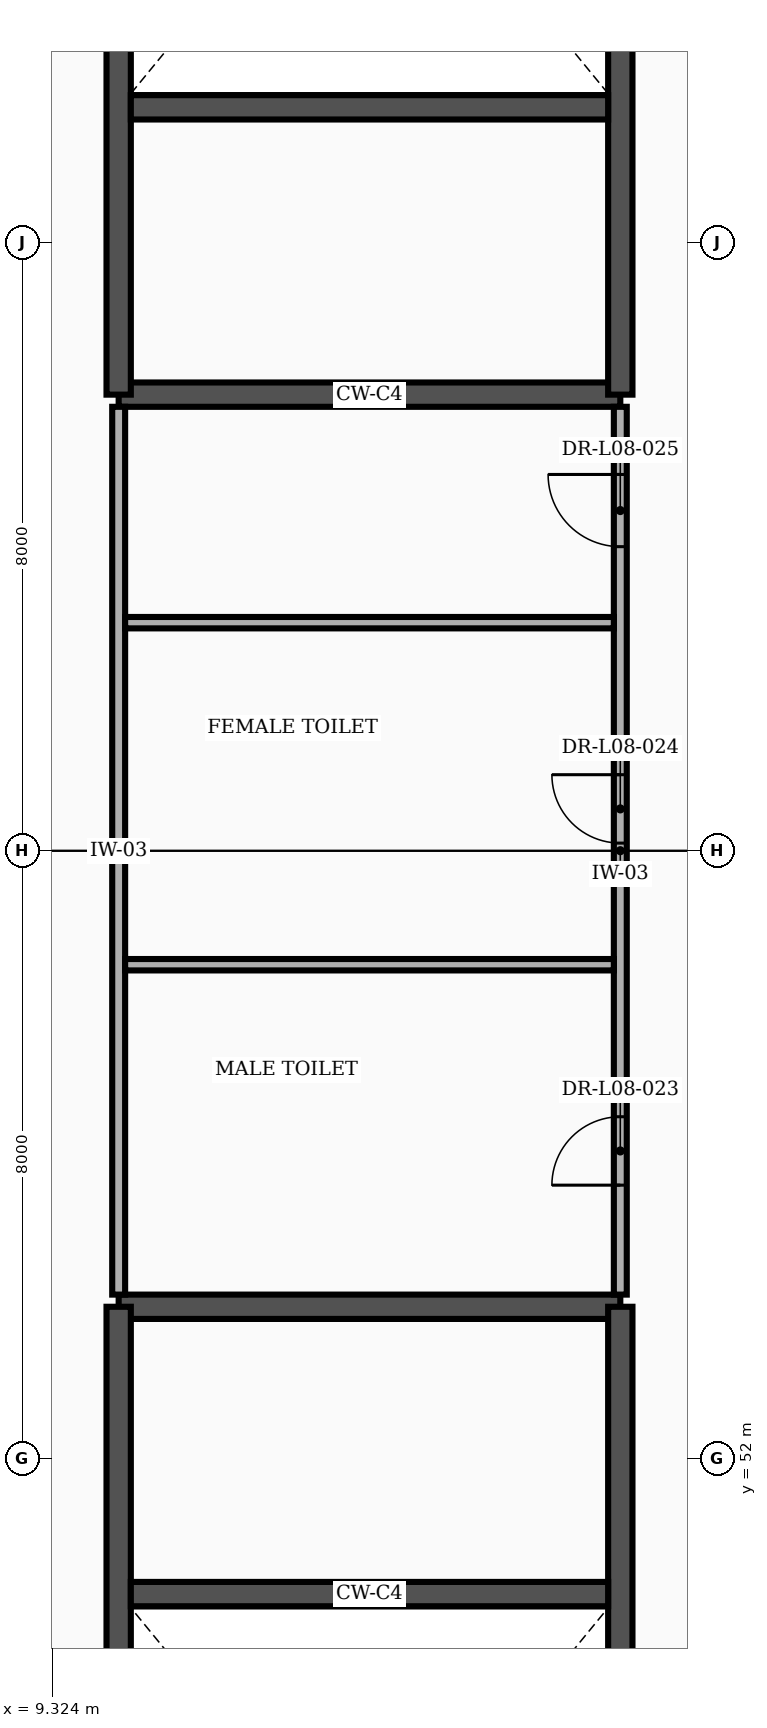
"""IFC4 building model, lengths in metres.
Left out: names, types, materials, properties, quantities, classifications, styles, units other than length and angle.
Written with IfcOpenShell. Run it as: python <this file> out.ifc"""

import sys

from ifc_helpers import new_model, si_unit, direction, frame, frame_2d, origin, place, context, subcontext, project, spatial, rectangle, extrude, element, fill, save


model = new_model("IFC4")
c1 = context("Model", 3, precision=1e-05, world=origin(), true_north=direction((0.0, 1.0)))
c2 = subcontext(c1, "Body", "Model", "MODEL_VIEW")
j1 = project(units=[si_unit("LENGTHUNIT", "METRE"), si_unit("PLANEANGLEUNIT", "RADIAN")], contexts=[c1])
p1 = place(None, origin())
s1 = spatial("IfcSite", under=j1, at=p1, CompositionType="ELEMENT")
p2 = place(p1, origin())
s2 = spatial("IfcBuilding", under=s1, at=p2, CompositionType="ELEMENT")
p3 = place(p2, frame((0.0, 0.0, 37.8)))
s3 = spatial("IfcBuildingStorey", under=s2, at=p3, CompositionType="ELEMENT", Elevation=37.8)
p4 = place(p3, frame((10.2, 54.0, 0.0), z_axis=(0.0, 0.0, 1.0), x_axis=(1.0, 0.0, 0.0)))
e1 = element("IfcWall", 1, at=p4, inside=s3, PredefinedType="SHEAR", context=c2, shape_type="SweptSolid", body=[
    extrude(rectangle(XDim=6.6, YDim=0.32, at=frame_2d((3.3, 0.0))), origin(), (0.0, 0.0, 1.0), 3.565),
])
p5 = place(p3, frame((10.2, 39.4, 0.0), z_axis=(0.0, 0.0, 1.0), x_axis=(0.0, 1.0, 0.0)))
e2 = element("IfcWall", 2, at=p5, inside=s3, PredefinedType="SHEAR", context=c2, shape_type="SweptSolid", body=[
    extrude(rectangle(XDim=14.6, YDim=0.32, at=frame_2d((7.3, 0.0))), origin(), (0.0, 0.0, 1.0), 3.565),
])
p6 = place(p3, frame((16.8, 39.4, 0.0), z_axis=(0.0, 0.0, 1.0), x_axis=(0.0, 1.0, 0.0)))
e3 = element("IfcWall", 3, at=p6, inside=s3, PredefinedType="SHEAR", context=c2, shape_type="SweptSolid", body=[
    extrude(rectangle(XDim=14.6, YDim=0.32, at=frame_2d((7.3, 0.0))), origin(), (0.0, 0.0, 1.0), 3.565),
])
p7 = place(p6, frame((0.55, 0.0, 0.0)))
e4 = element("IfcOpeningElement", 4, at=p7, cuts=e3, PredefinedType="OPENING", context=c2, shape_type="SweptSolid", body=[
    extrude(rectangle(XDim=2.4, YDim=2.25, at=frame_2d((1.2, 1.125))), frame((0.0, 0.172, 0.0), z_axis=(0.0, -1.0, 0.0), x_axis=(1.0, 0.0, 0.0)), (0.0, 0.0, 1.0), 0.344),
])
p8 = place(p3, frame((10.36, 50.22, 0.0), z_axis=(0.0, 0.0, 1.0), x_axis=(1.0, 0.0, 0.0)))
e5 = element("IfcWall", 5, at=p8, inside=s3, PredefinedType="SHEAR", context=c2, shape_type="SweptSolid", body=[
    extrude(rectangle(XDim=6.28, YDim=0.32, at=frame_2d((3.14, 0.0))), origin(), (0.0, 0.0, 1.0), 3.565),
])
p9 = place(p3, frame((10.2, 66.0, 0.0), z_axis=(0.0, 0.0, 1.0), x_axis=(1.0, 0.0, 0.0)))
e6 = element("IfcWall", 6, at=p9, inside=s3, PredefinedType="SHEAR", context=c2, shape_type="SweptSolid", body=[
    extrude(rectangle(XDim=6.6, YDim=0.32, at=frame_2d((3.3, 0.0))), origin(), (0.0, 0.0, 1.0), 3.565),
])
p10 = place(p3, frame((10.2, 66.0, 0.0), z_axis=(0.0, 0.0, 1.0), x_axis=(0.0, 1.0, 0.0)))
e7 = element("IfcWall", 7, at=p10, inside=s3, PredefinedType="SHEAR", context=c2, shape_type="SweptSolid", body=[
    extrude(rectangle(XDim=14.6, YDim=0.32, at=frame_2d((7.3, 0.0))), origin(), (0.0, 0.0, 1.0), 3.565),
])
p11 = place(p3, frame((16.8, 66.0, 0.0), z_axis=(0.0, 0.0, 1.0), x_axis=(0.0, 1.0, 0.0)))
e8 = element("IfcWall", 8, at=p11, inside=s3, PredefinedType="SHEAR", context=c2, shape_type="SweptSolid", body=[
    extrude(rectangle(XDim=14.6, YDim=0.32, at=frame_2d((7.3, 0.0))), origin(), (0.0, 0.0, 1.0), 3.565),
])
p12 = place(p11, frame((11.65, 0.0, 0.0)))
e9 = element("IfcOpeningElement", 9, at=p12, cuts=e8, PredefinedType="OPENING", context=c2, shape_type="SweptSolid", body=[
    extrude(rectangle(XDim=2.4, YDim=2.25, at=frame_2d((1.2, 1.125))), frame((0.0, 0.172, 0.0), z_axis=(0.0, -1.0, 0.0), x_axis=(1.0, 0.0, 0.0)), (0.0, 0.0, 1.0), 0.344),
])
p13 = place(p3, frame((10.36, 69.78, 0.0), z_axis=(0.0, 0.0, 1.0), x_axis=(1.0, 0.0, 0.0)))
e10 = element("IfcWall", 10, at=p13, inside=s3, PredefinedType="SHEAR", context=c2, shape_type="SweptSolid", body=[
    extrude(rectangle(XDim=6.28, YDim=0.32, at=frame_2d((3.14, 0.0))), origin(), (0.0, 0.0, 1.0), 3.565),
])
p14 = place(p3, frame((10.2, 54.16, 0.0), z_axis=(0.0, 0.0, 1.0), x_axis=(0.0, 1.0, 0.0)))
e11 = element("IfcWall", 11, at=p14, inside=s3, PredefinedType="PARTITIONING", context=c2, shape_type="SweptSolid", body=[
    extrude(rectangle(XDim=11.68, YDim=0.17, at=frame_2d((5.84, 0.0))), origin(), (0.0, 0.0, 1.0), 3.565),
])
p15 = place(p3, frame((16.8, 54.16, 0.0), z_axis=(0.0, 0.0, 1.0), x_axis=(0.0, 1.0, 0.0)))
e12 = element("IfcWall", 12, at=p15, inside=s3, PredefinedType="PARTITIONING", context=c2, shape_type="SweptSolid", body=[
    extrude(rectangle(XDim=11.68, YDim=0.17, at=frame_2d((5.84, 0.0))), origin(), (0.0, 0.0, 1.0), 3.565),
])
p16 = place(p15, frame((1.44, 0.0, 0.0)))
e13 = element("IfcOpeningElement", 13, at=p16, cuts=e12, PredefinedType="OPENING", context=c2, shape_type="SweptSolid", body=[
    extrude(rectangle(XDim=0.9, YDim=2.1, at=frame_2d((0.45, 1.05))), frame((0.0, 0.097, 0.0), z_axis=(0.0, -1.0, 0.0), x_axis=(1.0, 0.0, 0.0)), (0.0, 0.0, 1.0), 0.194),
])
p17 = place(p15, frame((5.94, 0.0, 0.0)))
e14 = element("IfcOpeningElement", 14, at=p17, cuts=e12, PredefinedType="OPENING", context=c2, shape_type="SweptSolid", body=[
    extrude(rectangle(XDim=0.9, YDim=2.1, at=frame_2d((0.45, 1.05))), frame((0.0, 0.097, 0.0), z_axis=(0.0, -1.0, 0.0), x_axis=(1.0, 0.0, 0.0)), (0.0, 0.0, 1.0), 0.194),
])
p18 = place(p15, frame((9.84, 0.0, 0.0)))
e15 = element("IfcOpeningElement", 15, at=p18, cuts=e12, PredefinedType="OPENING", context=c2, shape_type="SweptSolid", body=[
    extrude(rectangle(XDim=0.95, YDim=2.1, at=frame_2d((0.475, 1.05))), frame((0.0, 0.097, 0.0), z_axis=(0.0, -1.0, 0.0), x_axis=(1.0, 0.0, 0.0)), (0.0, 0.0, 1.0), 0.194),
])
for number, where, z_axis, x_axis in (
    (16, (10.285, 58.5, 0.0), (0.0, 0.0, 1.0), (1.0, 0.0, 0.0)),
    (17, (10.285, 63.0, 0.0), (0.0, 0.0, 1.0), (1.0, 0.0, 0.0)),
):
    element("IfcWall", number, at=place(p3, frame(where, z_axis=z_axis, x_axis=x_axis)), inside=s3, PredefinedType="PARTITIONING", context=c2, shape_type="SweptSolid", body=[
        extrude(rectangle(XDim=6.43, YDim=0.15, at=frame_2d((3.215, 0.0))), origin(), (0.0, 0.0, 1.0), 3.565),
    ])
p19 = place(p16, origin())
e18 = element("IfcDoor", 18, at=p19, inside=s3, OperationType="SINGLE_SWING_LEFT", PredefinedType="DOOR", context=c2, shape_type="SweptSolid", body=[
    extrude(rectangle(XDim=0.9, YDim=2.1, at=frame_2d((0.45, 1.05))), frame((0.0, 0.025, 0.0), z_axis=(0.0, -1.0, 0.0), x_axis=(1.0, 0.0, 0.0)), (0.0, 0.0, 1.0), 0.05),
])
fill(e13, e18)
p20 = place(p17, origin())
e19 = element("IfcDoor", 19, at=p20, inside=s3, OperationType="SINGLE_SWING_RIGHT", PredefinedType="DOOR", context=c2, shape_type="SweptSolid", body=[
    extrude(rectangle(XDim=0.9, YDim=2.1, at=frame_2d((0.45, 1.05))), frame((0.0, 0.025, 0.0), z_axis=(0.0, -1.0, 0.0), x_axis=(1.0, 0.0, 0.0)), (0.0, 0.0, 1.0), 0.05),
])
fill(e14, e19)
p21 = place(p18, origin())
e20 = element("IfcDoor", 20, at=p21, inside=s3, OperationType="SINGLE_SWING_RIGHT", PredefinedType="DOOR", context=c2, shape_type="SweptSolid", body=[
    extrude(rectangle(XDim=0.95, YDim=2.1, at=frame_2d((0.475, 1.05))), frame((0.0, 0.025, 0.0), z_axis=(0.0, -1.0, 0.0), x_axis=(1.0, 0.0, 0.0)), (0.0, 0.0, 1.0), 0.05),
])
fill(e15, e20)
save(model, sys.argv[1])
